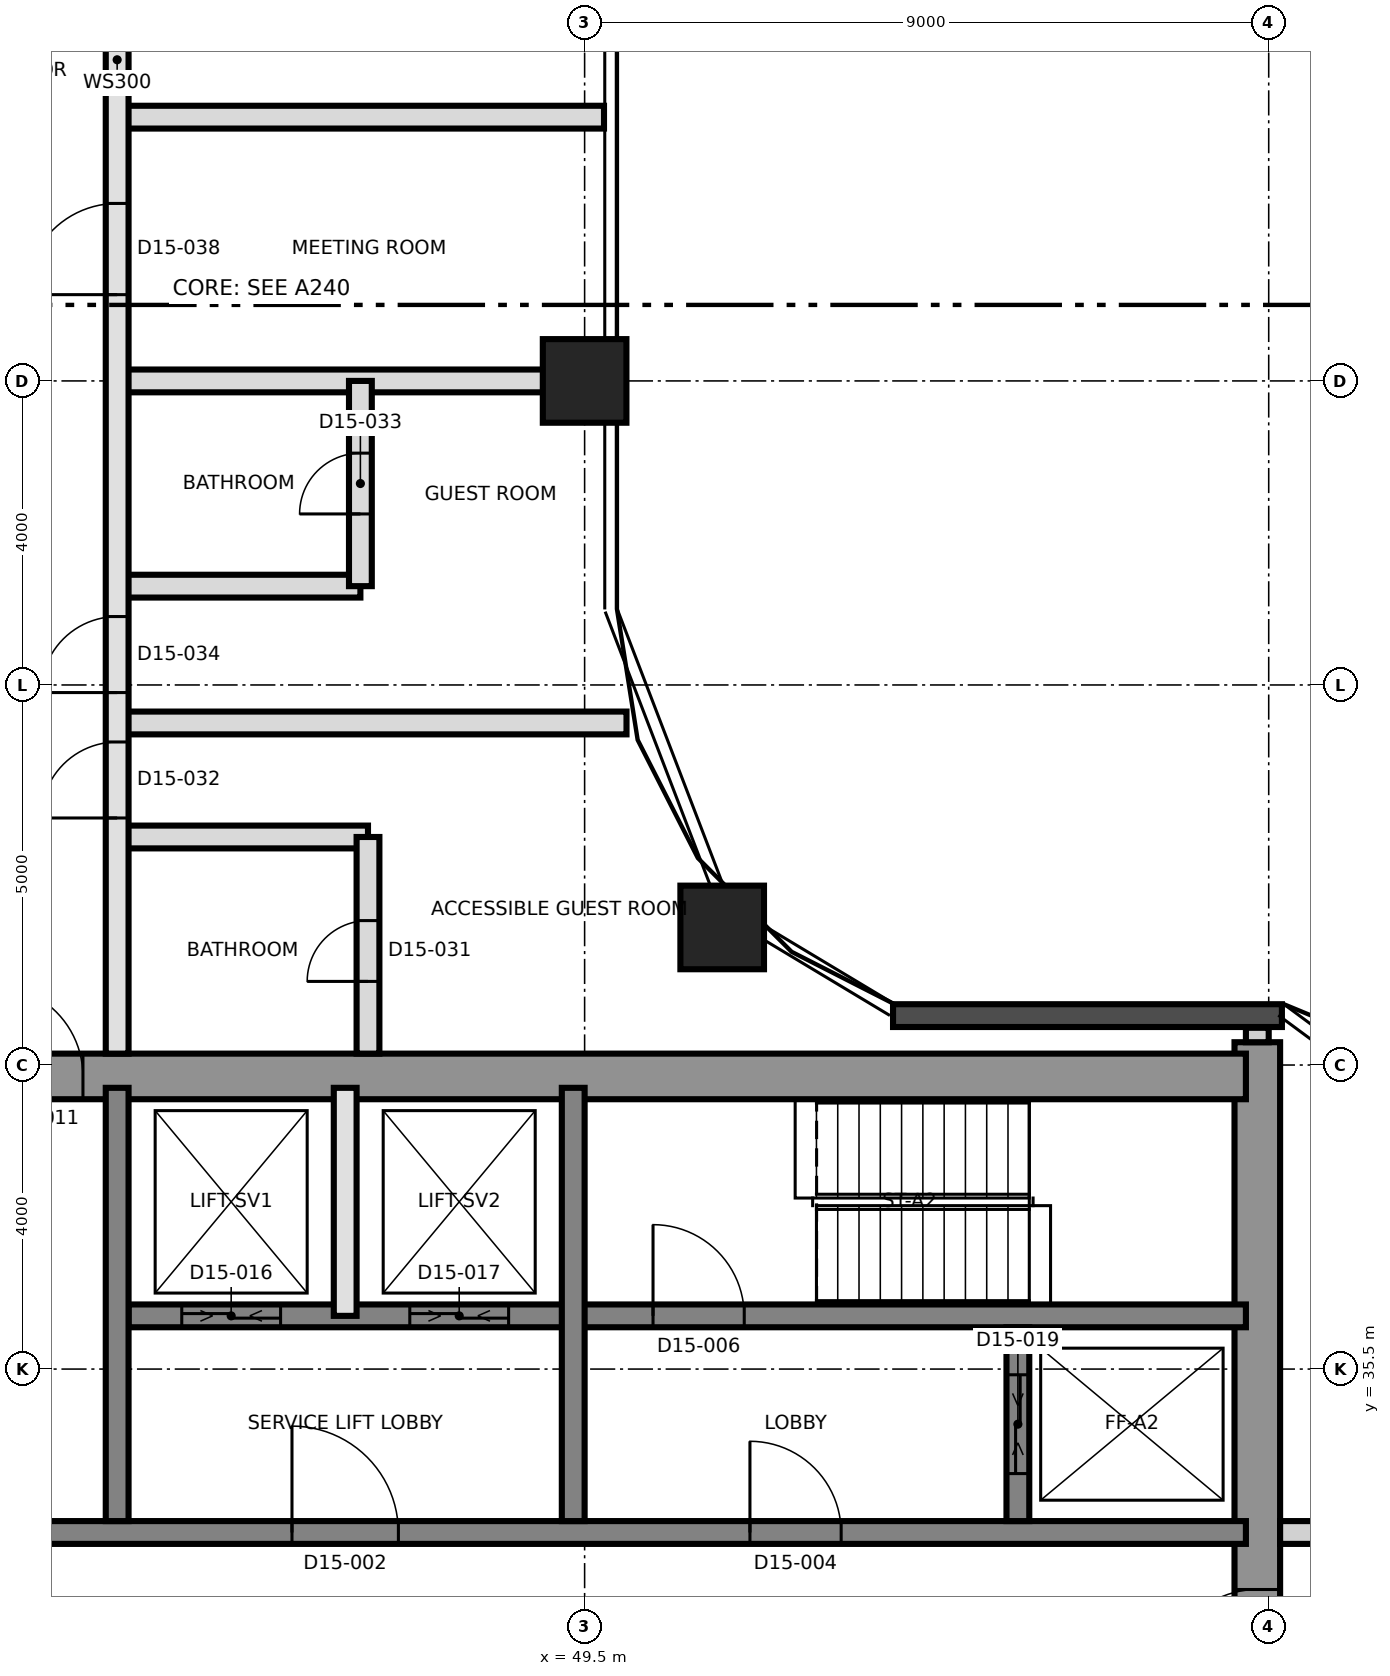
"""IFC4 building model, lengths in metres.
Left out: names, types, materials, properties, quantities, classifications, styles, units other than length and angle.
Written with IfcOpenShell. Run it as: python <this file> out.ifc"""

import sys

from ifc_helpers import new_model, si_unit, direction, frame, frame_2d, origin, origin_2d, place, context, subcontext, project, spatial, rectangle, extrude, element, fill, save


model = new_model("IFC4")
c1 = context("Model", 3, precision=1e-05, world=origin(), true_north=direction((0.0, 1.0)))
c2 = subcontext(c1, "Body", "Model", "MODEL_VIEW")
j1 = project(units=[si_unit("LENGTHUNIT", "METRE"), si_unit("PLANEANGLEUNIT", "RADIAN")], contexts=[c1])
p1 = place(None, origin())
s1 = spatial("IfcSite", under=j1, at=p1, CompositionType="ELEMENT")
p2 = place(p1, origin())
s2 = spatial("IfcBuilding", under=s1, at=p2, CompositionType="ELEMENT")
p3 = place(p2, frame((0.0, 0.0, 153.3)))
s3 = spatial("IfcBuildingStorey", under=s2, at=p3, CompositionType="ELEMENT", Elevation=153.3)
p4 = place(p3, frame((58.35, 21.2, 0.0), z_axis=(0.0, 0.0, 1.0), x_axis=(0.0, 1.0, 0.0)))
e1 = element("IfcWall", 1, at=p4, inside=s3, PredefinedType="SHEAR", context=c2, shape_type="SweptSolid", body=[
    extrude(rectangle(XDim=18.6, YDim=0.6, at=frame_2d((9.3, 0.0))), origin(), (0.0, 0.0, 1.0), 3.7),
])
p5 = place(p4, frame((10.2, 0.0, 0.0)))
e2 = element("IfcOpeningElement", 2, at=p5, cuts=e1, PredefinedType="OPENING", context=c2, shape_type="SweptSolid", body=[
    extrude(rectangle(XDim=1.2, YDim=2.1, at=frame_2d((0.6, 1.05))), frame((0.0, 0.31, 0.0), z_axis=(0.0, -1.0, 0.0), x_axis=(1.0, 0.0, 0.0)), (0.0, 0.0, 1.0), 0.62),
])
p6 = place(p3, frame((31.2, 39.35, 0.0), z_axis=(0.0, 0.0, 1.0), x_axis=(1.0, 0.0, 0.0)))
e3 = element("IfcWall", 3, at=p6, inside=s3, PredefinedType="SHEAR", context=c2, shape_type="SweptSolid", body=[
    extrude(rectangle(XDim=27.0, YDim=0.6, at=frame_2d((13.5, 0.0))), origin(), (0.0, 0.0, 1.0), 3.7),
])
p7 = place(p6, frame((10.5, 0.0, 0.0)))
e4 = element("IfcOpeningElement", 4, at=p7, cuts=e3, PredefinedType="OPENING", context=c2, shape_type="SweptSolid", body=[
    extrude(rectangle(XDim=1.2, YDim=2.1, at=frame_2d((0.6, 1.05))), frame((0.0, 0.31, 0.0), z_axis=(0.0, -1.0, 0.0), x_axis=(1.0, 0.0, 0.0)), (0.0, 0.0, 1.0), 0.62),
])
p8 = place(p3, frame((31.8, 33.35, 0.0), z_axis=(0.0, 0.0, 1.0), x_axis=(1.0, 0.0, 0.0)))
e5 = element("IfcWall", 5, at=p8, inside=s3, PredefinedType="SHEAR", context=c2, shape_type="SweptSolid", body=[
    extrude(rectangle(XDim=26.4, YDim=0.3, at=frame_2d((13.2, 0.0))), origin(), (0.0, 0.0, 1.0), 3.7),
])
p9 = place(p8, frame((13.85, 0.0, 0.0)))
e6 = element("IfcOpeningElement", 6, at=p9, cuts=e5, PredefinedType="OPENING", context=c2, shape_type="SweptSolid", body=[
    extrude(rectangle(XDim=1.4, YDim=2.1, at=frame_2d((0.7, 1.05))), frame((0.0, 0.16, 0.0), z_axis=(0.0, -1.0, 0.0), x_axis=(1.0, 0.0, 0.0)), (0.0, 0.0, 1.0), 0.32),
])
p10 = place(p8, frame((5.325, 0.0, 0.0)))
e7 = element("IfcOpeningElement", 7, at=p10, cuts=e5, PredefinedType="OPENING", context=c2, shape_type="SweptSolid", body=[
    extrude(rectangle(XDim=1.2, YDim=2.1, at=frame_2d((0.6, 1.05))), frame((0.0, 0.16, 0.0), z_axis=(0.0, -1.0, 0.0), x_axis=(1.0, 0.0, 0.0)), (0.0, 0.0, 1.0), 0.32),
])
p11 = place(p8, frame((19.875, 0.0, 0.0)))
e8 = element("IfcOpeningElement", 8, at=p11, cuts=e5, PredefinedType="OPENING", context=c2, shape_type="SweptSolid", body=[
    extrude(rectangle(XDim=1.2, YDim=2.1, at=frame_2d((0.6, 1.05))), frame((0.0, 0.16, 0.0), z_axis=(0.0, -1.0, 0.0), x_axis=(1.0, 0.0, 0.0)), (0.0, 0.0, 1.0), 0.32),
])
p12 = place(p3, frame((43.5, 36.2, 0.0), z_axis=(0.0, 0.0, 1.0), x_axis=(1.0, 0.0, 0.0)))
e9 = element("IfcWall", 9, at=p12, inside=s3, PredefinedType="SHEAR", context=c2, shape_type="SweptSolid", body=[
    extrude(rectangle(XDim=14.7, YDim=0.3, at=frame_2d((7.35, 0.0))), origin(), (0.0, 0.0, 1.0), 3.7),
])
p13 = place(p12, frame((6.9, 0.0, 0.0)))
e10 = element("IfcOpeningElement", 10, at=p13, cuts=e9, PredefinedType="OPENING", context=c2, shape_type="SweptSolid", body=[
    extrude(rectangle(XDim=1.2, YDim=2.1, at=frame_2d((0.6, 1.05))), frame((0.0, 0.16, 0.0), z_axis=(0.0, -1.0, 0.0), x_axis=(1.0, 0.0, 0.0)), (0.0, 0.0, 1.0), 0.32),
])
p14 = place(p12, frame((0.7, 0.0, 0.0)))
e11 = element("IfcOpeningElement", 11, at=p14, cuts=e9, PredefinedType="OPENING", context=c2, shape_type="SweptSolid", body=[
    extrude(rectangle(XDim=1.3, YDim=2.4, at=frame_2d((0.65, 1.2))), frame((0.0, 0.16, 0.0), z_axis=(0.0, -1.0, 0.0), x_axis=(1.0, 0.0, 0.0)), (0.0, 0.0, 1.0), 0.32),
])
p15 = place(p12, frame((3.7, 0.0, 0.0)))
e12 = element("IfcOpeningElement", 12, at=p15, cuts=e9, PredefinedType="OPENING", context=c2, shape_type="SweptSolid", body=[
    extrude(rectangle(XDim=1.3, YDim=2.4, at=frame_2d((0.65, 1.2))), frame((0.0, 0.16, 0.0), z_axis=(0.0, -1.0, 0.0), x_axis=(1.0, 0.0, 0.0)), (0.0, 0.0, 1.0), 0.32),
])
for number, where, z_axis, x_axis in (
    (13, (43.35, 33.5, 0.0), (0.0, 0.0, 1.0), (0.0, 1.0, 0.0)),
    (14, (49.35, 33.5, 0.0), (0.0, 0.0, 1.0), (0.0, 1.0, 0.0)),
):
    element("IfcWall", number, at=place(p3, frame(where, z_axis=z_axis, x_axis=x_axis)), inside=s3, PredefinedType="SHEAR", context=c2, shape_type="SweptSolid", body=[
        extrude(rectangle(XDim=5.7, YDim=0.3, at=frame_2d((2.85, 0.0))), origin(), (0.0, 0.0, 1.0), 3.7),
    ])
p16 = place(p3, frame((55.2, 33.5, 0.0), z_axis=(0.0, 0.0, 1.0), x_axis=(0.0, 1.0, 0.0)))
e15 = element("IfcWall", 15, at=p16, inside=s3, PredefinedType="SHEAR", context=c2, shape_type="SweptSolid", body=[
    extrude(rectangle(XDim=2.55, YDim=0.3, at=frame_2d((1.275, 0.0))), origin(), (0.0, 0.0, 1.0), 3.7),
])
p17 = place(p16, frame((0.625, 0.0, 0.0)))
e16 = element("IfcOpeningElement", 16, at=p17, cuts=e15, PredefinedType="OPENING", context=c2, shape_type="SweptSolid", body=[
    extrude(rectangle(XDim=1.3, YDim=2.4, at=frame_2d((0.65, 1.2))), frame((0.0, 0.16, 0.0), z_axis=(0.0, -1.0, 0.0), x_axis=(1.0, 0.0, 0.0)), (0.0, 0.0, 1.0), 0.32),
])
for number, where, z_axis, x_axis in (
    (17, (51.31, 41.31, 0.0), (0.0, 0.0, 1.0), (1.0, 0.0, 0.0)),
    (18, (49.5, 48.5, 0.0), (0.0, 0.0, 1.0), (1.0, 0.0, 0.0)),
):
    element("IfcColumn", number, at=place(p3, frame(where, z_axis=z_axis, x_axis=x_axis)), inside=s3, PredefinedType="COLUMN", context=c2, shape_type="SweptSolid", body=[
        extrude(rectangle(XDim=1.1, YDim=1.1, at=origin_2d()), origin(), (0.0, 0.0, 1.0), 3.7),
    ])
p18 = place(p3, frame((58.674, 40.15, 0.0), z_axis=(0.0, 0.0, 1.0), x_axis=(-1.0, 0.0, 0.0)))
e19 = element("IfcWall", 19, at=p18, inside=s3, PredefinedType="SOLIDWALL", context=c2, shape_type="SweptSolid", body=[
    extrude(rectangle(XDim=5.116, YDim=0.3, at=frame_2d((2.558, 0.0))), origin(), (0.0, 0.0, 1.0), 3.4),
])
p19 = place(p3, frame((46.35, 36.2, 0.0), z_axis=(0.0, 0.0, 1.0), x_axis=(0.0, 1.0, 0.0)))
e20 = element("IfcWall", 20, at=p19, inside=s3, PredefinedType="SOLIDWALL", context=c2, shape_type="SweptSolid", body=[
    extrude(rectangle(XDim=3.0, YDim=0.3, at=frame_2d((1.5, 0.0))), origin(), (0.0, 0.0, 1.0), 3.4),
])
p20 = place(p3, frame((58.65, 33.35, 0.0), z_axis=(0.0, 0.0, 1.0), x_axis=(1.0, 0.0, 0.0)))
e21 = element("IfcWall", 21, at=p20, inside=s3, PredefinedType="PARTITIONING", context=c2, shape_type="SweptSolid", body=[
    extrude(rectangle(XDim=8.5, YDim=0.3, at=frame_2d((4.25, 0.0))), origin(), (0.0, 0.0, 1.0), 3.4),
])
p21 = place(p20, frame((0.428, 0.0, 0.0)))
e22 = element("IfcOpeningElement", 22, at=p21, cuts=e21, PredefinedType="OPENING", context=c2, shape_type="SweptSolid", body=[
    extrude(rectangle(XDim=1.0, YDim=2.1, at=frame_2d((0.5, 1.05))), frame((0.0, 0.16, 0.0), z_axis=(0.0, -1.0, 0.0), x_axis=(1.0, 0.0, 0.0)), (0.0, 0.0, 1.0), 0.32),
])
p22 = place(p20, frame((6.078, 0.0, 0.0)))
e23 = element("IfcOpeningElement", 23, at=p22, cuts=e21, PredefinedType="OPENING", context=c2, shape_type="SweptSolid", body=[
    extrude(rectangle(XDim=1.0, YDim=2.1, at=frame_2d((0.5, 1.05))), frame((0.0, 0.16, 0.0), z_axis=(0.0, -1.0, 0.0), x_axis=(1.0, 0.0, 0.0)), (0.0, 0.0, 1.0), 0.32),
])
p23 = place(p3, frame((43.35, 42.5, 0.0), z_axis=(0.0, 0.0, 1.0), x_axis=(1.0, 0.0, 0.0)))
e24 = element("IfcWall", 24, at=p23, inside=s3, PredefinedType="PARTITIONING", context=c2, shape_type="SweptSolid", body=[
    extrude(rectangle(XDim=3.3, YDim=0.3, at=frame_2d((1.65, 0.0))), origin(), (0.0, 0.0, 1.0), 3.4),
])
p24 = place(p3, frame((43.35, 44.0, 0.0), z_axis=(0.0, 0.0, 1.0), x_axis=(1.0, 0.0, 0.0)))
e25 = element("IfcWall", 25, at=p24, inside=s3, PredefinedType="PARTITIONING", context=c2, shape_type="SweptSolid", body=[
    extrude(rectangle(XDim=6.701, YDim=0.3, at=frame_2d((3.351, 0.0))), origin(), (0.0, 0.0, 1.0), 3.4),
])
p25 = place(p3, frame((43.35, 45.8, 0.0), z_axis=(0.0, 0.0, 1.0), x_axis=(1.0, 0.0, 0.0)))
e26 = element("IfcWall", 26, at=p25, inside=s3, PredefinedType="PARTITIONING", context=c2, shape_type="SweptSolid", body=[
    extrude(rectangle(XDim=3.2, YDim=0.3, at=frame_2d((1.6, 0.0))), origin(), (0.0, 0.0, 1.0), 3.4),
])
p26 = place(p3, frame((43.35, 48.5, 0.0), z_axis=(0.0, 0.0, 1.0), x_axis=(1.0, 0.0, 0.0)))
e27 = element("IfcWall", 27, at=p26, inside=s3, PredefinedType="PARTITIONING", context=c2, shape_type="SweptSolid", body=[
    extrude(rectangle(XDim=6.225, YDim=0.3, at=frame_2d((3.112, 0.0))), origin(), (0.0, 0.0, 1.0), 3.4),
])
p27 = place(p3, frame((43.35, 51.97, 0.0), z_axis=(0.0, 0.0, 1.0), x_axis=(1.0, 0.0, 0.0)))
e28 = element("IfcWall", 28, at=p27, inside=s3, PredefinedType="PARTITIONING", context=c2, shape_type="SweptSolid", body=[
    extrude(rectangle(XDim=6.405, YDim=0.3, at=frame_2d((3.202, 0.0))), origin(), (0.0, 0.0, 1.0), 3.4),
])
p28 = place(p3, frame((43.35, 39.65, 0.0), z_axis=(0.0, 0.0, 1.0), x_axis=(0.0, 1.0, 0.0)))
e29 = element("IfcWall", 29, at=p28, inside=s3, PredefinedType="SOLIDWALL", context=c2, shape_type="SweptSolid", body=[
    extrude(rectangle(XDim=26.15, YDim=0.3, at=frame_2d((13.075, 0.0))), origin(), (0.0, 0.0, 1.0), 3.4),
])
p29 = place(p28, frame((3.1, 0.0, 0.0)))
e30 = element("IfcOpeningElement", 30, at=p29, cuts=e29, PredefinedType="OPENING", context=c2, shape_type="SweptSolid", body=[
    extrude(rectangle(XDim=1.0, YDim=2.1, at=frame_2d((0.5, 1.05))), frame((0.0, 0.16, 0.0), z_axis=(0.0, -1.0, 0.0), x_axis=(1.0, 0.0, 0.0)), (0.0, 0.0, 1.0), 0.32),
])
p30 = place(p28, frame((4.75, 0.0, 0.0)))
e31 = element("IfcOpeningElement", 31, at=p30, cuts=e29, PredefinedType="OPENING", context=c2, shape_type="SweptSolid", body=[
    extrude(rectangle(XDim=1.0, YDim=2.1, at=frame_2d((0.5, 1.05))), frame((0.0, 0.16, 0.0), z_axis=(0.0, -1.0, 0.0), x_axis=(1.0, 0.0, 0.0)), (0.0, 0.0, 1.0), 0.32),
])
p31 = place(p28, frame((9.985, 0.0, 0.0)))
e32 = element("IfcOpeningElement", 32, at=p31, cuts=e29, PredefinedType="OPENING", context=c2, shape_type="SweptSolid", body=[
    extrude(rectangle(XDim=1.2, YDim=2.1, at=frame_2d((0.6, 1.05))), frame((0.0, 0.16, 0.0), z_axis=(0.0, -1.0, 0.0), x_axis=(1.0, 0.0, 0.0)), (0.0, 0.0, 1.0), 0.32),
])
p32 = place(p28, frame((13.235, 0.0, 0.0)))
e33 = element("IfcOpeningElement", 33, at=p32, cuts=e29, PredefinedType="OPENING", context=c2, shape_type="SweptSolid", body=[
    extrude(rectangle(XDim=1.0, YDim=2.1, at=frame_2d((0.5, 1.05))), frame((0.0, 0.16, 0.0), z_axis=(0.0, -1.0, 0.0), x_axis=(1.0, 0.0, 0.0)), (0.0, 0.0, 1.0), 0.32),
])
p33 = place(p28, frame((21.4, 0.0, 0.0)))
e34 = element("IfcOpeningElement", 34, at=p33, cuts=e29, PredefinedType="OPENING", context=c2, shape_type="SweptSolid", body=[
    extrude(rectangle(XDim=1.0, YDim=2.4, at=frame_2d((0.5, 1.2))), frame((0.0, 0.16, 0.0), z_axis=(0.0, -1.0, 0.0), x_axis=(1.0, 0.0, 0.0)), (0.0, 0.0, 1.0), 0.32),
])
p34 = place(p3, frame((46.55, 45.8, 0.0), z_axis=(0.0, 0.0, 1.0), x_axis=(0.0, 1.0, 0.0)))
e35 = element("IfcWall", 35, at=p34, inside=s3, PredefinedType="PARTITIONING", context=c2, shape_type="SweptSolid", body=[
    extrude(rectangle(XDim=2.7, YDim=0.3, at=frame_2d((1.35, 0.0))), origin(), (0.0, 0.0, 1.0), 3.4),
])
p35 = place(p34, frame((0.95, 0.0, 0.0)))
e36 = element("IfcOpeningElement", 36, at=p35, cuts=e35, PredefinedType="OPENING", context=c2, shape_type="SweptSolid", body=[
    extrude(rectangle(XDim=0.8, YDim=2.1, at=frame_2d((0.4, 1.05))), frame((0.0, 0.16, 0.0), z_axis=(0.0, -1.0, 0.0), x_axis=(1.0, 0.0, 0.0)), (0.0, 0.0, 1.0), 0.32),
])
p36 = place(p3, frame((46.65, 39.65, 0.0), z_axis=(0.0, 0.0, 1.0), x_axis=(0.0, 1.0, 0.0)))
e37 = element("IfcWall", 37, at=p36, inside=s3, PredefinedType="PARTITIONING", context=c2, shape_type="SweptSolid", body=[
    extrude(rectangle(XDim=2.85, YDim=0.3, at=frame_2d((1.425, 0.0))), origin(), (0.0, 0.0, 1.0), 3.4),
])
p37 = place(p36, frame((0.95, 0.0, 0.0)))
e38 = element("IfcOpeningElement", 38, at=p37, cuts=e37, PredefinedType="OPENING", context=c2, shape_type="SweptSolid", body=[
    extrude(rectangle(XDim=0.8, YDim=2.1, at=frame_2d((0.4, 1.05))), frame((0.0, 0.16, 0.0), z_axis=(0.0, -1.0, 0.0), x_axis=(1.0, 0.0, 0.0)), (0.0, 0.0, 1.0), 0.32),
])
p38 = place(p3, frame((58.35, 39.8, 0.0), z_axis=(0.0, 0.0, 1.0), x_axis=(0.0, 1.0, 0.0)))
e39 = element("IfcWall", 39, at=p38, inside=s3, PredefinedType="PARTITIONING", context=c2, shape_type="SweptSolid", body=[
    extrude(rectangle(XDim=0.19, YDim=0.3, at=frame_2d((0.095, 0.0))), origin(), (0.0, 0.0, 1.0), 3.4),
])
p39 = place(p9, origin())
e40 = element("IfcDoor", 40, at=p39, inside=s3, OperationType="SINGLE_SWING_RIGHT", PredefinedType="DOOR", context=c2, shape_type="SweptSolid", body=[
    extrude(rectangle(XDim=1.4, YDim=2.1, at=frame_2d((0.7, 1.05))), frame((0.0, 0.025, 0.0), z_axis=(0.0, -1.0, 0.0), x_axis=(1.0, 0.0, 0.0)), (0.0, 0.0, 1.0), 0.05),
])
fill(e6, e40)
p40 = place(p11, origin())
e41 = element("IfcDoor", 41, at=p40, inside=s3, OperationType="SINGLE_SWING_RIGHT", PredefinedType="DOOR", context=c2, shape_type="SweptSolid", body=[
    extrude(rectangle(XDim=1.2, YDim=2.1, at=frame_2d((0.6, 1.05))), frame((0.0, 0.025, 0.0), z_axis=(0.0, -1.0, 0.0), x_axis=(1.0, 0.0, 0.0)), (0.0, 0.0, 1.0), 0.05),
])
fill(e8, e41)
p41 = place(p13, origin())
e42 = element("IfcDoor", 42, at=p41, inside=s3, OperationType="SINGLE_SWING_LEFT", PredefinedType="DOOR", context=c2, shape_type="SweptSolid", body=[
    extrude(rectangle(XDim=1.2, YDim=2.1, at=frame_2d((0.6, 1.05))), frame((0.0, 0.025, 0.0), z_axis=(0.0, -1.0, 0.0), x_axis=(1.0, 0.0, 0.0)), (0.0, 0.0, 1.0), 0.05),
])
fill(e10, e42)
p42 = place(p5, origin())
e43 = element("IfcDoor", 43, at=p42, inside=s3, OperationType="SINGLE_SWING_LEFT", PredefinedType="DOOR", context=c2, shape_type="SweptSolid", body=[
    extrude(rectangle(XDim=1.2, YDim=2.1, at=frame_2d((0.6, 1.05))), frame((0.0, 0.025, 0.0), z_axis=(0.0, -1.0, 0.0), x_axis=(1.0, 0.0, 0.0)), (0.0, 0.0, 1.0), 0.05),
])
fill(e2, e43)
p43 = place(p7, origin())
e44 = element("IfcDoor", 44, at=p43, inside=s3, OperationType="SINGLE_SWING_RIGHT", PredefinedType="DOOR", context=c2, shape_type="SweptSolid", body=[
    extrude(rectangle(XDim=1.2, YDim=2.1, at=frame_2d((0.6, 1.05))), frame((0.0, 0.025, 0.0), z_axis=(0.0, -1.0, 0.0), x_axis=(1.0, 0.0, 0.0)), (0.0, 0.0, 1.0), 0.05),
])
fill(e4, e44)
p44 = place(p14, origin())
e45 = element("IfcDoor", 45, at=p44, inside=s3, OperationType="SLIDING_TO_LEFT", PredefinedType="DOOR", context=c2, shape_type="SweptSolid", body=[
    extrude(rectangle(XDim=1.3, YDim=2.4, at=frame_2d((0.65, 1.2))), frame((0.0, 0.025, 0.0), z_axis=(0.0, -1.0, 0.0), x_axis=(1.0, 0.0, 0.0)), (0.0, 0.0, 1.0), 0.05),
])
fill(e11, e45)
p45 = place(p15, origin())
e46 = element("IfcDoor", 46, at=p45, inside=s3, OperationType="SLIDING_TO_LEFT", PredefinedType="DOOR", context=c2, shape_type="SweptSolid", body=[
    extrude(rectangle(XDim=1.3, YDim=2.4, at=frame_2d((0.65, 1.2))), frame((0.0, 0.025, 0.0), z_axis=(0.0, -1.0, 0.0), x_axis=(1.0, 0.0, 0.0)), (0.0, 0.0, 1.0), 0.05),
])
fill(e12, e46)
p46 = place(p17, origin())
e47 = element("IfcDoor", 47, at=p46, inside=s3, OperationType="SLIDING_TO_LEFT", PredefinedType="DOOR", context=c2, shape_type="SweptSolid", body=[
    extrude(rectangle(XDim=1.3, YDim=2.4, at=frame_2d((0.65, 1.2))), frame((0.0, 0.025, 0.0), z_axis=(0.0, -1.0, 0.0), x_axis=(1.0, 0.0, 0.0)), (0.0, 0.0, 1.0), 0.05),
])
fill(e16, e47)
p47 = place(p37, origin())
e48 = element("IfcDoor", 48, at=p47, inside=s3, OperationType="SINGLE_SWING_LEFT", PredefinedType="DOOR", context=c2, shape_type="SweptSolid", body=[
    extrude(rectangle(XDim=0.8, YDim=2.1, at=frame_2d((0.4, 1.05))), frame((0.0, 0.025, 0.0), z_axis=(0.0, -1.0, 0.0), x_axis=(1.0, 0.0, 0.0)), (0.0, 0.0, 1.0), 0.05),
])
fill(e38, e48)
p48 = place(p29, origin())
e49 = element("IfcDoor", 49, at=p48, inside=s3, OperationType="SINGLE_SWING_RIGHT", PredefinedType="DOOR", context=c2, shape_type="SweptSolid", body=[
    extrude(rectangle(XDim=1.0, YDim=2.1, at=frame_2d((0.5, 1.05))), frame((0.0, 0.025, 0.0), z_axis=(0.0, -1.0, 0.0), x_axis=(1.0, 0.0, 0.0)), (0.0, 0.0, 1.0), 0.05),
])
fill(e30, e49)
p49 = place(p35, origin())
e50 = element("IfcDoor", 50, at=p49, inside=s3, OperationType="SINGLE_SWING_RIGHT", PredefinedType="DOOR", context=c2, shape_type="SweptSolid", body=[
    extrude(rectangle(XDim=0.8, YDim=2.1, at=frame_2d((0.4, 1.05))), frame((0.0, 0.025, 0.0), z_axis=(0.0, -1.0, 0.0), x_axis=(1.0, 0.0, 0.0)), (0.0, 0.0, 1.0), 0.05),
])
fill(e36, e50)
p50 = place(p30, origin())
e51 = element("IfcDoor", 51, at=p50, inside=s3, OperationType="SINGLE_SWING_LEFT", PredefinedType="DOOR", context=c2, shape_type="SweptSolid", body=[
    extrude(rectangle(XDim=1.0, YDim=2.1, at=frame_2d((0.5, 1.05))), frame((0.0, 0.025, 0.0), z_axis=(0.0, -1.0, 0.0), x_axis=(1.0, 0.0, 0.0)), (0.0, 0.0, 1.0), 0.05),
])
fill(e31, e51)
p51 = place(p31, origin())
e52 = element("IfcDoor", 52, at=p51, inside=s3, OperationType="SINGLE_SWING_LEFT", PredefinedType="DOOR", context=c2, shape_type="SweptSolid", body=[
    extrude(rectangle(XDim=1.2, YDim=2.1, at=frame_2d((0.6, 1.05))), frame((0.0, 0.025, 0.0), z_axis=(0.0, -1.0, 0.0), x_axis=(1.0, 0.0, 0.0)), (0.0, 0.0, 1.0), 0.05),
])
fill(e32, e52)
save(model, sys.argv[1])
